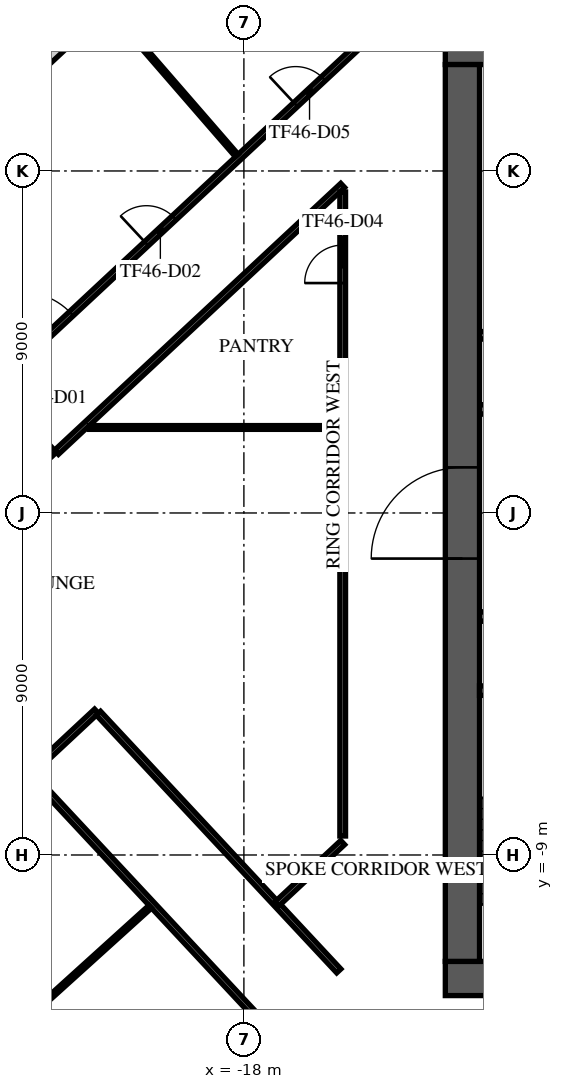
"""IFC4 building model, lengths in metres.
Left out: names, types, materials, properties, quantities, classifications, styles, units other than length and angle.
Written with IfcOpenShell. Run it as: python <this file> out.ifc"""

import sys

from ifc_helpers import new_model, si_unit, direction, frame, frame_2d, origin, place, context, subcontext, project, spatial, rectangle, extrude, element, fill, save


model = new_model("IFC4")
c1 = context("Model", 3, precision=1e-05, world=origin(), true_north=direction((0.0, 1.0)))
c2 = subcontext(c1, "Body", "Model", "MODEL_VIEW")
j1 = project(units=[si_unit("LENGTHUNIT", "METRE"), si_unit("PLANEANGLEUNIT", "RADIAN")], contexts=[c1])
p1 = place(None, origin())
s1 = spatial("IfcSite", under=j1, at=p1, CompositionType="ELEMENT")
p2 = place(p1, origin())
s2 = spatial("IfcBuilding", under=s1, at=p2, CompositionType="ELEMENT")
p3 = place(p2, frame((0.0, 0.0, 197.3)))
s3 = spatial("IfcBuildingStorey", under=s2, at=p3, CompositionType="ELEMENT", Elevation=197.3)
p4 = place(p3, frame((-12.7, 12.25, 0.0), z_axis=(0.0, 0.0, 1.0), x_axis=(1.0, 0.0, 0.0)))
e1 = element("IfcWall", 1, at=p4, inside=s3, PredefinedType="SHEAR", context=c2, shape_type="SweptSolid", body=[
    extrude(rectangle(XDim=25.4, YDim=0.9, at=frame_2d((12.7, 0.0))), origin(), (0.0, 0.0, 1.0), 3.62),
])
p5 = place(p4, frame((11.5, 0.0, 0.0)))
e2 = element("IfcOpeningElement", 2, at=p5, cuts=e1, PredefinedType="OPENING", context=c2, shape_type="SweptSolid", body=[
    extrude(rectangle(XDim=2.4, YDim=2.4, at=frame_2d((1.2, 1.2))), frame((0.0, 0.46, 0.0), z_axis=(0.0, -1.0, 0.0), x_axis=(1.0, 0.0, 0.0)), (0.0, 0.0, 1.0), 0.92),
])
p6 = place(p4, frame((22.325, 0.0, 0.0)))
e3 = element("IfcOpeningElement", 3, at=p6, cuts=e1, PredefinedType="OPENING", context=c2, shape_type="SweptSolid", body=[
    extrude(rectangle(XDim=1.2, YDim=2.1, at=frame_2d((0.6, 1.05))), frame((0.0, 0.46, 0.0), z_axis=(0.0, -1.0, 0.0), x_axis=(1.0, 0.0, 0.0)), (0.0, 0.0, 1.0), 0.92),
])
p7 = place(p4, frame((1.3, 0.0, 0.0)))
e4 = element("IfcOpeningElement", 4, at=p7, cuts=e1, PredefinedType="OPENING", context=c2, shape_type="SweptSolid", body=[
    extrude(rectangle(XDim=1.0, YDim=2.1, at=frame_2d((0.5, 1.05))), frame((0.0, 0.46, 0.0), z_axis=(0.0, -1.0, 0.0), x_axis=(1.0, 0.0, 0.0)), (0.0, 0.0, 1.0), 0.92),
])
p8 = place(p3, frame((-12.7, -12.25, 0.0), z_axis=(0.0, 0.0, 1.0), x_axis=(1.0, 0.0, 0.0)))
e5 = element("IfcWall", 5, at=p8, inside=s3, PredefinedType="SHEAR", context=c2, shape_type="SweptSolid", body=[
    extrude(rectangle(XDim=25.4, YDim=0.9, at=frame_2d((12.7, 0.0))), origin(), (0.0, 0.0, 1.0), 3.62),
])
p9 = place(p8, frame((7.6, 0.0, 0.0)))
e6 = element("IfcOpeningElement", 6, at=p9, cuts=e5, PredefinedType="OPENING", context=c2, shape_type="SweptSolid", body=[
    extrude(rectangle(XDim=2.0, YDim=2.1, at=frame_2d((1.0, 1.05))), frame((0.0, 0.46, 0.0), z_axis=(0.0, -1.0, 0.0), x_axis=(1.0, 0.0, 0.0)), (0.0, 0.0, 1.0), 0.92),
])
p10 = place(p8, frame((17.725, 0.0, 0.0)))
e7 = element("IfcOpeningElement", 7, at=p10, cuts=e5, PredefinedType="OPENING", context=c2, shape_type="SweptSolid", body=[
    extrude(rectangle(XDim=1.2, YDim=2.1, at=frame_2d((0.6, 1.05))), frame((0.0, 0.46, 0.0), z_axis=(0.0, -1.0, 0.0), x_axis=(1.0, 0.0, 0.0)), (0.0, 0.0, 1.0), 0.92),
])
p11 = place(p8, frame((1.875, 0.0, 0.0)))
e8 = element("IfcOpeningElement", 8, at=p11, cuts=e5, PredefinedType="OPENING", context=c2, shape_type="SweptSolid", body=[
    extrude(rectangle(XDim=1.2, YDim=2.1, at=frame_2d((0.6, 1.05))), frame((0.0, 0.46, 0.0), z_axis=(0.0, -1.0, 0.0), x_axis=(1.0, 0.0, 0.0)), (0.0, 0.0, 1.0), 0.92),
])
p12 = place(p8, frame((22.325, 0.0, 0.0)))
e9 = element("IfcOpeningElement", 9, at=p12, cuts=e5, PredefinedType="OPENING", context=c2, shape_type="SweptSolid", body=[
    extrude(rectangle(XDim=1.2, YDim=2.1, at=frame_2d((0.6, 1.05))), frame((0.0, 0.46, 0.0), z_axis=(0.0, -1.0, 0.0), x_axis=(1.0, 0.0, 0.0)), (0.0, 0.0, 1.0), 0.92),
])
p13 = place(p3, frame((-12.25, -11.8, 0.0), z_axis=(0.0, 0.0, 1.0), x_axis=(0.0, 1.0, 0.0)))
e10 = element("IfcWall", 10, at=p13, inside=s3, PredefinedType="SHEAR", context=c2, shape_type="SweptSolid", body=[
    extrude(rectangle(XDim=23.6, YDim=0.9, at=frame_2d((11.8, 0.0))), origin(), (0.0, 0.0, 1.0), 3.62),
])
p14 = place(p13, frame((10.6, 0.0, 0.0)))
e11 = element("IfcOpeningElement", 11, at=p14, cuts=e10, PredefinedType="OPENING", context=c2, shape_type="SweptSolid", body=[
    extrude(rectangle(XDim=2.4, YDim=2.4, at=frame_2d((1.2, 1.2))), frame((0.0, 0.46, 0.0), z_axis=(0.0, -1.0, 0.0), x_axis=(1.0, 0.0, 0.0)), (0.0, 0.0, 1.0), 0.92),
])
p15 = place(p3, frame((-8.65, -4.675, 0.0), z_axis=(0.0, 0.0, 1.0), x_axis=(-1.0, 0.0, 0.0)))
e12 = element("IfcWall", 12, at=p15, inside=s3, PredefinedType="SOLIDWALL", context=c2, shape_type="SweptSolid", body=[
    extrude(rectangle(XDim=3.15, YDim=0.25, at=frame_2d((1.575, 0.0))), origin(), (0.0, 0.0, 1.0), 3.62),
])
p16 = place(p3, frame((-11.795, -2.725, 0.0), z_axis=(0.0, 0.0, 1.0), x_axis=(1.0, 0.0, 0.0)))
e13 = element("IfcWall", 13, at=p16, inside=s3, PredefinedType="PARTITIONING", context=c2, shape_type="SweptSolid", body=[
    extrude(rectangle(XDim=8.915, YDim=0.25, at=frame_2d((4.458, 0.0))), origin(), (0.0, 0.0, 1.0), 3.62),
])
p17 = place(p16, frame((1.295, 0.0, 0.0)))
e14 = element("IfcOpeningElement", 14, at=p17, cuts=e13, PredefinedType="OPENING", context=c2, shape_type="SweptSolid", body=[
    extrude(rectangle(XDim=1.0, YDim=2.1, at=frame_2d((0.5, 1.05))), frame((0.0, 0.135, 0.0), z_axis=(0.0, -1.0, 0.0), x_axis=(1.0, 0.0, 0.0)), (0.0, 0.0, 1.0), 0.27),
])
p18 = place(p16, frame((4.42, 0.0, 0.0)))
e15 = element("IfcOpeningElement", 15, at=p18, cuts=e13, PredefinedType="OPENING", context=c2, shape_type="SweptSolid", body=[
    extrude(rectangle(XDim=1.0, YDim=2.1, at=frame_2d((0.5, 1.05))), frame((0.0, 0.135, 0.0), z_axis=(0.0, -1.0, 0.0), x_axis=(1.0, 0.0, 0.0)), (0.0, 0.0, 1.0), 0.27),
])
p19 = place(p3, frame((-11.795, 2.725, 0.0), z_axis=(0.0, 0.0, 1.0), x_axis=(1.0, 0.0, 0.0)))
e16 = element("IfcWall", 16, at=p19, inside=s3, PredefinedType="PARTITIONING", context=c2, shape_type="SweptSolid", body=[
    extrude(rectangle(XDim=3.415, YDim=0.25, at=frame_2d((1.708, 0.0))), origin(), (0.0, 0.0, 1.0), 3.62),
])
p20 = place(p19, frame((1.345, 0.0, 0.0)))
e17 = element("IfcOpeningElement", 17, at=p20, cuts=e16, PredefinedType="OPENING", context=c2, shape_type="SweptSolid", body=[
    extrude(rectangle(XDim=0.9, YDim=2.1, at=frame_2d((0.45, 1.05))), frame((0.0, 0.135, 0.0), z_axis=(0.0, -1.0, 0.0), x_axis=(1.0, 0.0, 0.0)), (0.0, 0.0, 1.0), 0.27),
])
p21 = place(p3, frame((-11.795, 4.675, 0.0), z_axis=(0.0, 0.0, 1.0), x_axis=(1.0, 0.0, 0.0)))
e18 = element("IfcWall", 18, at=p21, inside=s3, PredefinedType="PARTITIONING", context=c2, shape_type="SweptSolid", body=[
    extrude(rectangle(XDim=3.415, YDim=0.2, at=frame_2d((1.708, 0.0))), origin(), (0.0, 0.0, 1.0), 3.62),
])
p22 = place(p3, frame((1.073, 34.773, 0.0), z_axis=(0.0, 0.0, 1.0), x_axis=(-0.731351780381, -0.682000420333, 0.0)))
e19 = element("IfcWall", 19, at=p22, inside=s3, PredefinedType="STANDARD", context=c2, shape_type="SweptSolid", body=[
    extrude(rectangle(XDim=49.0, YDim=0.6, at=frame_2d((24.5, 0.0))), origin(), (0.0, 0.0, 1.0), 3.62),
])
p23 = place(p22, frame((1.227, 0.0, 0.9)))
e20 = element("IfcOpeningElement", 20, at=p23, cuts=e19, PredefinedType="OPENING", context=c2, shape_type="SweptSolid", body=[
    extrude(rectangle(XDim=2.0, YDim=2.1, at=frame_2d((1.0, 1.05))), frame((0.0, 0.31, 0.0), z_axis=(0.0, -1.0, 0.0), x_axis=(1.0, 0.0, 0.0)), (0.0, 0.0, 1.0), 0.62),
])
p24 = place(p22, frame((5.682, 0.0, 0.9)))
e21 = element("IfcOpeningElement", 21, at=p24, cuts=e19, PredefinedType="OPENING", context=c2, shape_type="SweptSolid", body=[
    extrude(rectangle(XDim=2.0, YDim=2.1, at=frame_2d((1.0, 1.05))), frame((0.0, 0.31, 0.0), z_axis=(0.0, -1.0, 0.0), x_axis=(1.0, 0.0, 0.0)), (0.0, 0.0, 1.0), 0.62),
])
p25 = place(p22, frame((14.591, 0.0, 0.9)))
e22 = element("IfcOpeningElement", 22, at=p25, cuts=e19, PredefinedType="OPENING", context=c2, shape_type="SweptSolid", body=[
    extrude(rectangle(XDim=2.0, YDim=2.1, at=frame_2d((1.0, 1.05))), frame((0.0, 0.31, 0.0), z_axis=(0.0, -1.0, 0.0), x_axis=(1.0, 0.0, 0.0)), (0.0, 0.0, 1.0), 0.62),
])
p26 = place(p22, frame((19.045, 0.0, 0.9)))
e23 = element("IfcOpeningElement", 23, at=p26, cuts=e19, PredefinedType="OPENING", context=c2, shape_type="SweptSolid", body=[
    extrude(rectangle(XDim=2.0, YDim=2.1, at=frame_2d((1.0, 1.05))), frame((0.0, 0.31, 0.0), z_axis=(0.0, -1.0, 0.0), x_axis=(1.0, 0.0, 0.0)), (0.0, 0.0, 1.0), 0.62),
])
p27 = place(p22, frame((23.5, 0.0, 0.9)))
e24 = element("IfcOpeningElement", 24, at=p27, cuts=e19, PredefinedType="OPENING", context=c2, shape_type="SweptSolid", body=[
    extrude(rectangle(XDim=2.0, YDim=2.1, at=frame_2d((1.0, 1.05))), frame((0.0, 0.31, 0.0), z_axis=(0.0, -1.0, 0.0), x_axis=(1.0, 0.0, 0.0)), (0.0, 0.0, 1.0), 0.62),
])
p28 = place(p22, frame((27.955, 0.0, 0.9)))
e25 = element("IfcOpeningElement", 25, at=p28, cuts=e19, PredefinedType="OPENING", context=c2, shape_type="SweptSolid", body=[
    extrude(rectangle(XDim=2.0, YDim=2.1, at=frame_2d((1.0, 1.05))), frame((0.0, 0.31, 0.0), z_axis=(0.0, -1.0, 0.0), x_axis=(1.0, 0.0, 0.0)), (0.0, 0.0, 1.0), 0.62),
])
p29 = place(p22, frame((32.409, 0.0, 0.9)))
e26 = element("IfcOpeningElement", 26, at=p29, cuts=e19, PredefinedType="OPENING", context=c2, shape_type="SweptSolid", body=[
    extrude(rectangle(XDim=2.0, YDim=2.1, at=frame_2d((1.0, 1.05))), frame((0.0, 0.31, 0.0), z_axis=(0.0, -1.0, 0.0), x_axis=(1.0, 0.0, 0.0)), (0.0, 0.0, 1.0), 0.62),
])
p30 = place(p22, frame((36.864, 0.0, 0.9)))
e27 = element("IfcOpeningElement", 27, at=p30, cuts=e19, PredefinedType="OPENING", context=c2, shape_type="SweptSolid", body=[
    extrude(rectangle(XDim=2.0, YDim=2.1, at=frame_2d((1.0, 1.05))), frame((0.0, 0.31, 0.0), z_axis=(0.0, -1.0, 0.0), x_axis=(1.0, 0.0, 0.0)), (0.0, 0.0, 1.0), 0.62),
])
p31 = place(p22, frame((41.318, 0.0, 0.9)))
e28 = element("IfcOpeningElement", 28, at=p31, cuts=e19, PredefinedType="OPENING", context=c2, shape_type="SweptSolid", body=[
    extrude(rectangle(XDim=2.0, YDim=2.1, at=frame_2d((1.0, 1.05))), frame((0.0, 0.31, 0.0), z_axis=(0.0, -1.0, 0.0), x_axis=(1.0, 0.0, 0.0)), (0.0, 0.0, 1.0), 0.62),
])
p32 = place(p22, frame((45.773, 0.0, 0.9)))
e29 = element("IfcOpeningElement", 29, at=p32, cuts=e19, PredefinedType="OPENING", context=c2, shape_type="SweptSolid", body=[
    extrude(rectangle(XDim=2.0, YDim=2.1, at=frame_2d((1.0, 1.05))), frame((0.0, 0.31, 0.0), z_axis=(0.0, -1.0, 0.0), x_axis=(1.0, 0.0, 0.0)), (0.0, 0.0, 1.0), 0.62),
])
p33 = place(p3, frame((-35.02, -5.994, 0.0), z_axis=(0.0, 0.0, 1.0), x_axis=(0.682002361324, -0.731349970362, 0.0)))
e30 = element("IfcWall", 30, at=p33, inside=s3, PredefinedType="STANDARD", context=c2, shape_type="SweptSolid", body=[
    extrude(rectangle(XDim=39.0, YDim=0.6, at=frame_2d((19.5, 0.0))), origin(), (0.0, 0.0, 1.0), 3.62),
])
p34 = place(p33, frame((1.217, 0.0, 0.9)))
e31 = element("IfcOpeningElement", 31, at=p34, cuts=e30, PredefinedType="OPENING", context=c2, shape_type="SweptSolid", body=[
    extrude(rectangle(XDim=1.9, YDim=2.1, at=frame_2d((0.95, 1.05))), frame((0.0, 0.31, 0.0), z_axis=(0.0, -1.0, 0.0), x_axis=(1.0, 0.0, 0.0)), (0.0, 0.0, 1.0), 0.62),
])
p35 = place(p33, frame((5.55, 0.0, 0.9)))
e32 = element("IfcOpeningElement", 32, at=p35, cuts=e30, PredefinedType="OPENING", context=c2, shape_type="SweptSolid", body=[
    extrude(rectangle(XDim=1.9, YDim=2.1, at=frame_2d((0.95, 1.05))), frame((0.0, 0.31, 0.0), z_axis=(0.0, -1.0, 0.0), x_axis=(1.0, 0.0, 0.0)), (0.0, 0.0, 1.0), 0.62),
])
p36 = place(p33, frame((9.883, 0.0, 0.9)))
e33 = element("IfcOpeningElement", 33, at=p36, cuts=e30, PredefinedType="OPENING", context=c2, shape_type="SweptSolid", body=[
    extrude(rectangle(XDim=1.9, YDim=2.1, at=frame_2d((0.95, 1.05))), frame((0.0, 0.31, 0.0), z_axis=(0.0, -1.0, 0.0), x_axis=(1.0, 0.0, 0.0)), (0.0, 0.0, 1.0), 0.62),
])
p37 = place(p33, frame((14.217, 0.0, 0.9)))
e34 = element("IfcOpeningElement", 34, at=p37, cuts=e30, PredefinedType="OPENING", context=c2, shape_type="SweptSolid", body=[
    extrude(rectangle(XDim=1.9, YDim=2.1, at=frame_2d((0.95, 1.05))), frame((0.0, 0.31, 0.0), z_axis=(0.0, -1.0, 0.0), x_axis=(1.0, 0.0, 0.0)), (0.0, 0.0, 1.0), 0.62),
])
p38 = place(p33, frame((18.55, 0.0, 0.9)))
e35 = element("IfcOpeningElement", 35, at=p38, cuts=e30, PredefinedType="OPENING", context=c2, shape_type="SweptSolid", body=[
    extrude(rectangle(XDim=1.9, YDim=2.1, at=frame_2d((0.95, 1.05))), frame((0.0, 0.31, 0.0), z_axis=(0.0, -1.0, 0.0), x_axis=(1.0, 0.0, 0.0)), (0.0, 0.0, 1.0), 0.62),
])
p39 = place(p33, frame((22.883, 0.0, 0.9)))
e36 = element("IfcOpeningElement", 36, at=p39, cuts=e30, PredefinedType="OPENING", context=c2, shape_type="SweptSolid", body=[
    extrude(rectangle(XDim=1.9, YDim=2.1, at=frame_2d((0.95, 1.05))), frame((0.0, 0.31, 0.0), z_axis=(0.0, -1.0, 0.0), x_axis=(1.0, 0.0, 0.0)), (0.0, 0.0, 1.0), 0.62),
])
p40 = place(p33, frame((27.217, 0.0, 0.9)))
e37 = element("IfcOpeningElement", 37, at=p40, cuts=e30, PredefinedType="OPENING", context=c2, shape_type="SweptSolid", body=[
    extrude(rectangle(XDim=1.9, YDim=2.1, at=frame_2d((0.95, 1.05))), frame((0.0, 0.31, 0.0), z_axis=(0.0, -1.0, 0.0), x_axis=(1.0, 0.0, 0.0)), (0.0, 0.0, 1.0), 0.62),
])
p41 = place(p33, frame((31.55, 0.0, 0.9)))
e38 = element("IfcOpeningElement", 38, at=p41, cuts=e30, PredefinedType="OPENING", context=c2, shape_type="SweptSolid", body=[
    extrude(rectangle(XDim=1.9, YDim=2.1, at=frame_2d((0.95, 1.05))), frame((0.0, 0.31, 0.0), z_axis=(0.0, -1.0, 0.0), x_axis=(1.0, 0.0, 0.0)), (0.0, 0.0, 1.0), 0.62),
])
p42 = place(p33, frame((35.883, 0.0, 0.9)))
e39 = element("IfcOpeningElement", 39, at=p42, cuts=e30, PredefinedType="OPENING", context=c2, shape_type="SweptSolid", body=[
    extrude(rectangle(XDim=1.9, YDim=2.1, at=frame_2d((0.95, 1.05))), frame((0.0, 0.31, 0.0), z_axis=(0.0, -1.0, 0.0), x_axis=(1.0, 0.0, 0.0)), (0.0, 0.0, 1.0), 0.62),
])
p43 = place(p3, frame((-24.623, 3.301, 0.0), z_axis=(0.0, 0.0, 1.0), x_axis=(0.731351215564, 0.68200102602, 0.0)))
e40 = element("IfcWall", 40, at=p43, inside=s3, PredefinedType="PARTITIONING", context=c2, shape_type="SweptSolid", body=[
    extrude(rectangle(XDim=31.513, YDim=0.15, at=frame_2d((15.757, 0.0))), origin(), (0.0, 0.0, 1.0), 3.17),
])
p44 = place(p43, frame((1.05, 0.0, 0.0)))
e41 = element("IfcOpeningElement", 41, at=p44, cuts=e40, PredefinedType="OPENING", context=c2, shape_type="SweptSolid", body=[
    extrude(rectangle(XDim=1.8, YDim=2.1, at=frame_2d((0.9, 1.05))), frame((0.0, 0.085, 0.0), z_axis=(0.0, -1.0, 0.0), x_axis=(1.0, 0.0, 0.0)), (0.0, 0.0, 1.0), 0.17),
])
p45 = place(p43, frame((5.55, 0.0, 0.0)))
e42 = element("IfcOpeningElement", 42, at=p45, cuts=e40, PredefinedType="OPENING", context=c2, shape_type="SweptSolid", body=[
    extrude(rectangle(XDim=1.0, YDim=2.1, at=frame_2d((0.5, 1.05))), frame((0.0, 0.085, 0.0), z_axis=(0.0, -1.0, 0.0), x_axis=(1.0, 0.0, 0.0)), (0.0, 0.0, 1.0), 0.17),
])
p46 = place(p43, frame((10.917, 0.0, 0.0)))
e43 = element("IfcOpeningElement", 43, at=p46, cuts=e40, PredefinedType="OPENING", context=c2, shape_type="SweptSolid", body=[
    extrude(rectangle(XDim=1.0, YDim=2.1, at=frame_2d((0.5, 1.05))), frame((0.0, 0.085, 0.0), z_axis=(0.0, -1.0, 0.0), x_axis=(1.0, 0.0, 0.0)), (0.0, 0.0, 1.0), 0.17),
])
p47 = place(p43, frame((20.812, 0.0, 0.0)))
e44 = element("IfcOpeningElement", 44, at=p47, cuts=e40, PredefinedType="OPENING", context=c2, shape_type="SweptSolid", body=[
    extrude(rectangle(XDim=1.0, YDim=2.1, at=frame_2d((0.5, 1.05))), frame((0.0, 0.085, 0.0), z_axis=(0.0, -1.0, 0.0), x_axis=(1.0, 0.0, 0.0)), (0.0, 0.0, 1.0), 0.17),
])
p48 = place(p3, frame((-24.572, 3.246, 0.0), z_axis=(0.0, 0.0, 1.0), x_axis=(0.682052557528, -0.73130315791, 0.0)))
e45 = element("IfcWall", 45, at=p48, inside=s3, PredefinedType="PARTITIONING", context=c2, shape_type="SweptSolid", body=[
    extrude(rectangle(XDim=2.325, YDim=0.15, at=frame_2d((1.163, 0.0))), origin(), (0.0, 0.0, 1.0), 3.17),
])
p49 = place(p3, frame((-23.633, -6.852, 0.0), z_axis=(0.0, 0.0, 1.0), x_axis=(0.731295398421, 0.682060877231, 0.0)))
e46 = element("IfcWall", 46, at=p49, inside=s3, PredefinedType="PARTITIONING", context=c2, shape_type="SweptSolid", body=[
    extrude(rectangle(XDim=2.4, YDim=0.15, at=frame_2d((1.2, 0.0))), origin(), (0.0, 0.0, 1.0), 3.62),
])
p50 = place(p3, frame((-23.582, -6.907, 0.0), z_axis=(0.0, 0.0, 1.0), x_axis=(0.68201130552, -0.73134162957, 0.0)))
e47 = element("IfcWall", 47, at=p50, inside=s3, PredefinedType="PARTITIONING", context=c2, shape_type="SweptSolid", body=[
    extrude(rectangle(XDim=22.137, YDim=0.15, at=frame_2d((11.069, 0.0))), origin(), (0.0, 0.0, 1.0), 3.17),
])
p51 = place(p50, frame((10.953, 0.0, 0.0)))
e48 = element("IfcOpeningElement", 48, at=p51, cuts=e47, PredefinedType="OPENING", context=c2, shape_type="SweptSolid", body=[
    extrude(rectangle(XDim=1.0, YDim=2.1, at=frame_2d((0.5, 1.05))), frame((0.0, 0.085, 0.0), z_axis=(0.0, -1.0, 0.0), x_axis=(1.0, 0.0, 0.0)), (0.0, 0.0, 1.0), 0.17),
])
p52 = place(p3, frame((-22.931, 1.597, 0.0), z_axis=(0.0, 0.0, 1.0), x_axis=(0.73135636677, 0.681995502027, 0.0)))
e49 = element("IfcWall", 49, at=p52, inside=s3, PredefinedType="PARTITIONING", context=c2, shape_type="SweptSolid", body=[
    extrude(rectangle(XDim=10.298, YDim=0.15, at=frame_2d((5.149, 0.0))), origin(), (0.0, 0.0, 1.0), 3.17),
])
p53 = place(p3, frame((-21.827, -5.27, 0.0), z_axis=(0.0, 0.0, 1.0), x_axis=(0.682018934887, -0.731334514744, 0.0)))
e50 = element("IfcWall", 50, at=p53, inside=s3, PredefinedType="PARTITIONING", context=c2, shape_type="SweptSolid", body=[
    extrude(rectangle(XDim=9.272, YDim=0.15, at=frame_2d((4.636, 0.0))), origin(), (0.0, 0.0, 1.0), 3.17),
])
p54 = place(p3, frame((-17.14, -10.295, 0.0), z_axis=(0.0, 0.0, 1.0), x_axis=(0.731509059071, 0.681831721539, 0.0)))
e51 = element("IfcWall", 51, at=p54, inside=s3, PredefinedType="PARTITIONING", context=c2, shape_type="SweptSolid", body=[
    extrude(rectangle(XDim=2.379, YDim=0.15, at=frame_2d((1.189, 0.0))), origin(), (0.0, 0.0, 1.0), 3.62),
])
p55 = place(p3, frame((-15.4, -8.5, 0.0), z_axis=(0.0, 0.0, 1.0), x_axis=(0.0, 1.0, 0.0)))
e52 = element("IfcWall", 52, at=p55, inside=s3, PredefinedType="PARTITIONING", context=c2, shape_type="SweptSolid", body=[
    extrude(rectangle(XDim=16.948, YDim=0.15, at=frame_2d((8.474, 0.0))), origin(), (0.0, 0.0, 1.0), 3.17),
])
p56 = place(p55, frame((14.551, 0.0, 0.0)))
e53 = element("IfcOpeningElement", 53, at=p56, cuts=e52, PredefinedType="OPENING", context=c2, shape_type="SweptSolid", body=[
    extrude(rectangle(XDim=1.0, YDim=2.1, at=frame_2d((0.5, 1.05))), frame((0.0, 0.085, 0.0), z_axis=(0.0, -1.0, 0.0), x_axis=(1.0, 0.0, 0.0)), (0.0, 0.0, 1.0), 0.17),
])
p57 = place(p3, frame((-25.927, -15.302, 0.0), z_axis=(0.0, 0.0, 1.0), x_axis=(0.741648836196, 0.670788344986, 0.0)))
e54 = element("IfcWall", 54, at=p57, inside=s3, PredefinedType="PARTITIONING", context=c2, shape_type="SweptSolid", body=[
    extrude(rectangle(XDim=7.366, YDim=0.1, at=frame_2d((3.683, 0.0))), origin(), (0.0, 0.0, 1.0), 2.97),
])
p58 = place(p3, frame((-22.067, 2.25, 0.0), z_axis=(0.0, 0.0, 1.0), x_axis=(1.0, 0.0, 0.0)))
e55 = element("IfcWall", 55, at=p58, inside=s3, PredefinedType="PARTITIONING", context=c2, shape_type="SweptSolid", body=[
    extrude(rectangle(XDim=6.592, YDim=0.1, at=frame_2d((3.296, 0.0))), origin(), (0.0, 0.0, 1.0), 3.62),
])
p59 = place(p3, frame((-21.542, 13.272, 0.0), z_axis=(0.0, 0.0, 1.0), x_axis=(0.655282861231, -0.755383592472, 0.0)))
e56 = element("IfcWall", 56, at=p59, inside=s3, PredefinedType="PARTITIONING", context=c2, shape_type="SweptSolid", body=[
    extrude(rectangle(XDim=5.117, YDim=0.1, at=frame_2d((2.559, 0.0))), origin(), (0.0, 0.0, 1.0), 2.97),
])
p60 = place(p14, origin())
e57 = element("IfcDoor", 57, at=p60, inside=s3, OperationType="SINGLE_SWING_LEFT", PredefinedType="DOOR", context=c2, shape_type="SweptSolid", body=[
    extrude(rectangle(XDim=2.4, YDim=2.4, at=frame_2d((1.2, 1.2))), frame((0.0, 0.025, 0.0), z_axis=(0.0, -1.0, 0.0), x_axis=(1.0, 0.0, 0.0)), (0.0, 0.0, 1.0), 0.05),
])
fill(e11, e57)
p61 = place(p29, origin())
e58 = element("IfcWindow", 58, at=p61, inside=s3, PartitioningType="SINGLE_PANEL", PredefinedType="WINDOW", context=c2, shape_type="SweptSolid", body=[
    extrude(rectangle(XDim=2.0, YDim=2.1, at=frame_2d((1.0, 1.05))), frame((0.0, 0.03, 0.0), z_axis=(0.0, -1.0, 0.0), x_axis=(1.0, 0.0, 0.0)), (0.0, 0.0, 1.0), 0.06),
])
fill(e26, e58)
p62 = place(p44, origin())
e59 = element("IfcDoor", 59, at=p62, inside=s3, OperationType="DOUBLE_DOOR_SINGLE_SWING", PredefinedType="DOOR", context=c2, shape_type="SweptSolid", body=[
    extrude(rectangle(XDim=1.8, YDim=2.1, at=frame_2d((0.9, 1.05))), frame((0.0, 0.025, 0.0), z_axis=(0.0, -1.0, 0.0), x_axis=(1.0, 0.0, 0.0)), (0.0, 0.0, 1.0), 0.05),
])
fill(e41, e59)
p63 = place(p45, origin())
e60 = element("IfcDoor", 60, at=p63, inside=s3, OperationType="SINGLE_SWING_LEFT", PredefinedType="DOOR", context=c2, shape_type="SweptSolid", body=[
    extrude(rectangle(XDim=1.0, YDim=2.1, at=frame_2d((0.5, 1.05))), frame((0.0, 0.025, 0.0), z_axis=(0.0, -1.0, 0.0), x_axis=(1.0, 0.0, 0.0)), (0.0, 0.0, 1.0), 0.05),
])
fill(e42, e60)
p64 = place(p56, origin())
e61 = element("IfcDoor", 61, at=p64, inside=s3, OperationType="SINGLE_SWING_RIGHT", PredefinedType="DOOR", context=c2, shape_type="SweptSolid", body=[
    extrude(rectangle(XDim=1.0, YDim=2.1, at=frame_2d((0.5, 1.05))), frame((0.0, 0.025, 0.0), z_axis=(0.0, -1.0, 0.0), x_axis=(1.0, 0.0, 0.0)), (0.0, 0.0, 1.0), 0.05),
])
fill(e53, e61)
p65 = place(p46, origin())
e62 = element("IfcDoor", 62, at=p65, inside=s3, OperationType="SINGLE_SWING_RIGHT", PredefinedType="DOOR", context=c2, shape_type="SweptSolid", body=[
    extrude(rectangle(XDim=1.0, YDim=2.1, at=frame_2d((0.5, 1.05))), frame((0.0, 0.025, 0.0), z_axis=(0.0, -1.0, 0.0), x_axis=(1.0, 0.0, 0.0)), (0.0, 0.0, 1.0), 0.05),
])
fill(e43, e62)
save(model, sys.argv[1])
